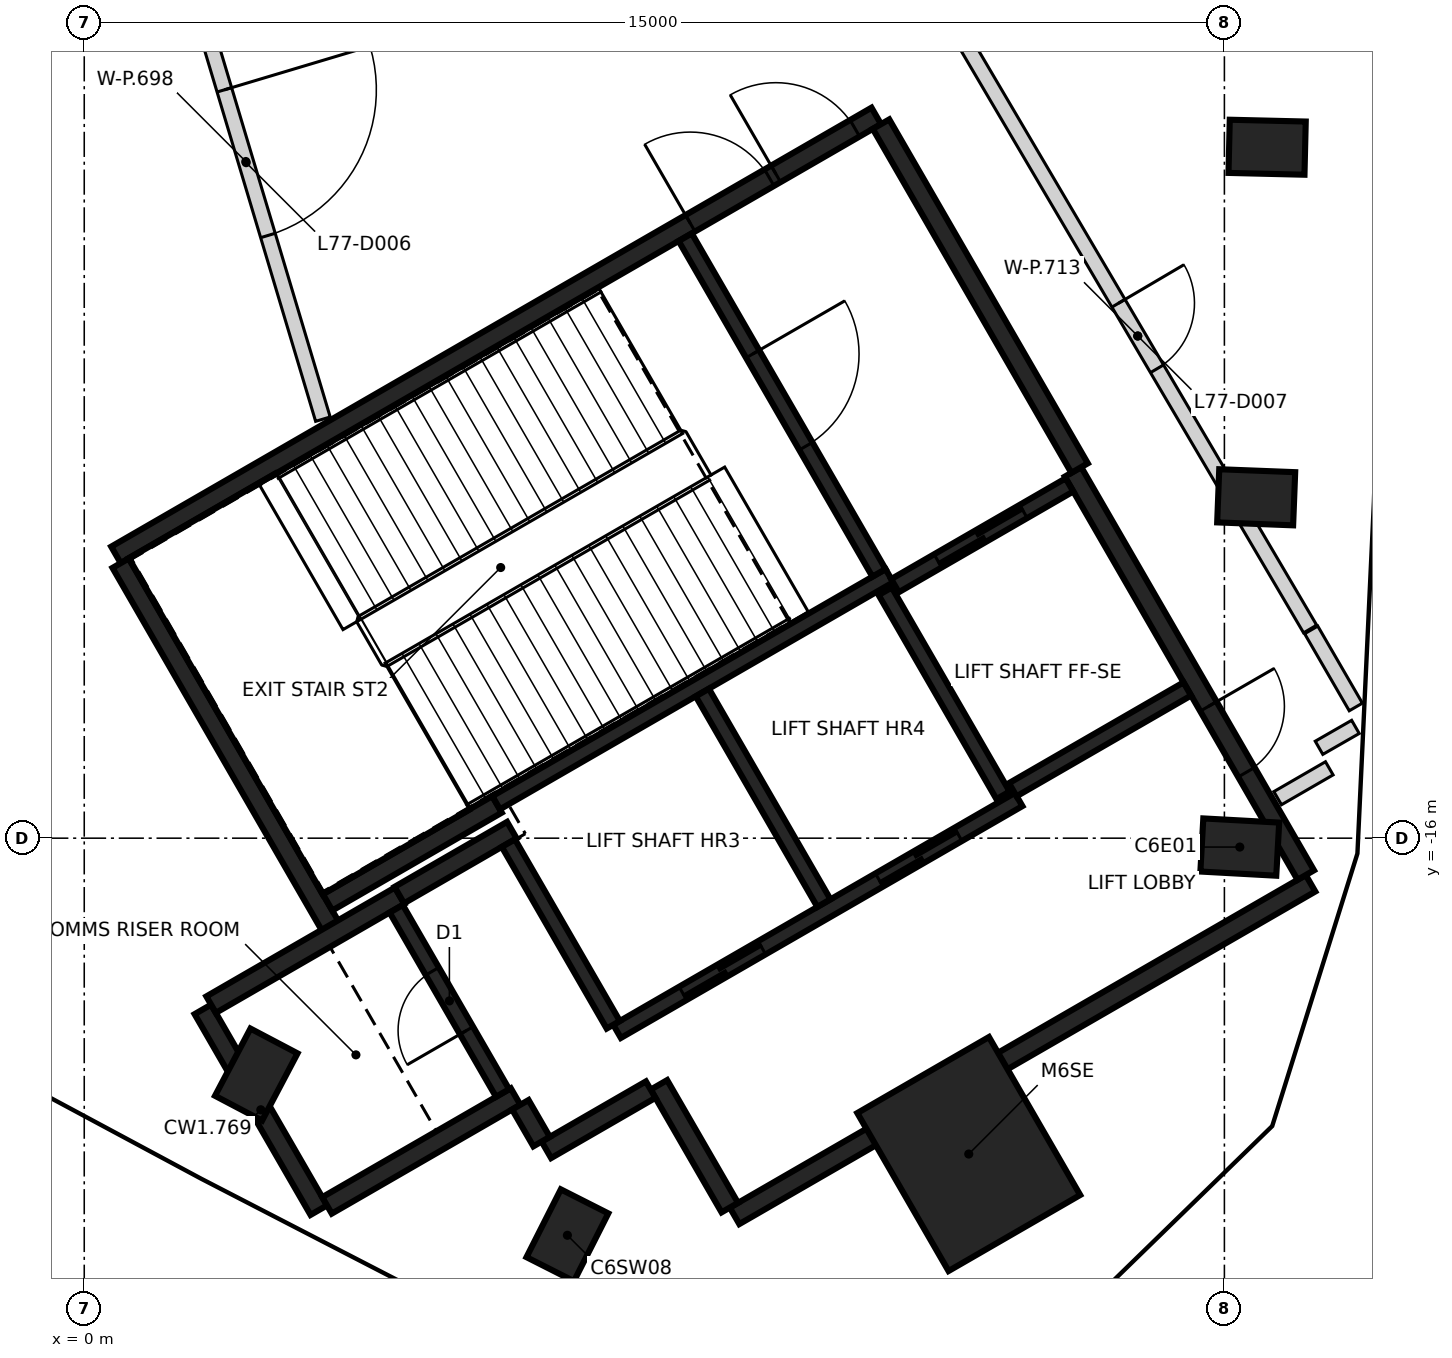
"""IFC4 building model, lengths in metres.
Left out: names, types, materials, properties, quantities, classifications, styles, units other than length and angle.
Written with IfcOpenShell. Run it as: python <this file> out.ifc"""

import sys

from ifc_helpers import new_model, si_unit, direction, frame, frame_2d, origin, origin_2d, place, context, subcontext, project, spatial, rectangle, extrude, element, fill, save


model = new_model("IFC4")
c1 = context("Model", 3, precision=1e-05, world=origin(), true_north=direction((0.0, 1.0)))
c2 = subcontext(c1, "Body", "Model", "MODEL_VIEW")
j1 = project(units=[si_unit("LENGTHUNIT", "METRE"), si_unit("PLANEANGLEUNIT", "RADIAN")], contexts=[c1])
p1 = place(None, origin())
s1 = spatial("IfcSite", under=j1, at=p1, CompositionType="ELEMENT")
p2 = place(p1, origin())
s2 = spatial("IfcBuilding", under=s1, at=p2, CompositionType="ELEMENT")
p3 = place(p2, frame((0.0, 0.0, 306.6)))
s3 = spatial("IfcBuildingStorey", under=s2, at=p3, CompositionType="ELEMENT", Elevation=306.6)
for number, where, z_axis, x_axis in (
    (1, (15.202, -16.117, -0.35), (0.0, 0.0, 1.0), (-0.998, 0.055, 0.0)),
    (2, (15.418, -11.515, -0.35), (0.0, 0.0, 1.0), (-0.999, 0.039, 0.0)),
    (3, (15.562, -6.91, -0.35), (0.0, 0.0, 1.0), (-1.0, 0.024, 0.0)),
    (4, (2.263, -19.11, -0.35), (0.0, 0.0, 1.0), (0.466, 0.885, 0.0)),
    (5, (6.356, -21.224, -0.35), (0.0, 0.0, 1.0), (0.452, 0.892, 0.0)),
):
    element("IfcColumn", number, at=place(p3, frame(where, z_axis=z_axis, x_axis=x_axis)), inside=s3, PredefinedType="COLUMN", context=c2, shape_type="SweptSolid", body=[
        extrude(rectangle(XDim=1.0, YDim=0.7, at=origin_2d()), origin(), (0.0, 0.0, 1.0), 6.0),
    ])
p4 = place(p3, frame((11.637, -20.155, -0.35), z_axis=(0.0, 0.0, 1.0), x_axis=(-0.5, 0.866025403784, 0.0)))
e6 = element("IfcColumn", 6, at=p4, inside=s3, PredefinedType="COLUMN", context=c2, shape_type="SweptSolid", body=[
    extrude(rectangle(XDim=2.4, YDim=2.0, at=origin_2d()), origin(), (0.0, 0.0, 1.0), 6.0),
])
p5 = place(p3, frame((0.417, -12.273, 0.0), z_axis=(0.0, 0.0, 1.0), x_axis=(0.866021906294, 0.500006057782, 0.0)))
e7 = element("IfcWall", 7, at=p5, inside=s3, PredefinedType="SHEAR", context=c2, shape_type="SweptSolid", body=[
    extrude(rectangle(XDim=11.55, YDim=0.25, at=frame_2d((5.775, 0.0))), origin(), (0.0, 0.0, 1.0), 5.65),
])
p6 = place(p5, frame((10.025, 0.0, 0.0)))
e8 = element("IfcOpeningElement", 8, at=p6, cuts=e7, PredefinedType="OPENING", context=c2, shape_type="SweptSolid", body=[
    extrude(rectangle(XDim=1.2, YDim=2.1, at=frame_2d((0.6, 1.05))), frame((0.0, 0.135, 0.0), z_axis=(0.0, -1.0, 0.0), x_axis=(1.0, 0.0, 0.0)), (0.0, 0.0, 1.0), 0.27),
])
p7 = place(p5, frame((8.725, 0.0, 0.0)))
e9 = element("IfcOpeningElement", 9, at=p7, cuts=e7, PredefinedType="OPENING", context=c2, shape_type="SweptSolid", body=[
    extrude(rectangle(XDim=1.2, YDim=2.1, at=frame_2d((0.6, 1.05))), frame((0.0, 0.135, 0.0), z_axis=(0.0, -1.0, 0.0), x_axis=(1.0, 0.0, 0.0)), (0.0, 0.0, 1.0), 0.27),
])
p8 = place(p3, frame((16.133, -16.594, 0.0), z_axis=(0.0, 0.0, 1.0), x_axis=(-0.866022959057, -0.500004234368, 0.0)))
e10 = element("IfcWall", 10, at=p8, inside=s3, PredefinedType="SHEAR", context=c2, shape_type="SweptSolid", body=[
    extrude(rectangle(XDim=8.75, YDim=0.25, at=frame_2d((4.375, 0.0))), origin(), (0.0, 0.0, 1.0), 5.65),
])
p9 = place(p3, frame((13.008, -11.181, 0.0), z_axis=(0.0, 0.0, 1.0), x_axis=(0.500001955336, -0.866024274868, 0.0)))
e11 = element("IfcWall", 11, at=p9, inside=s3, PredefinedType="SHEAR", context=c2, shape_type="SweptSolid", body=[
    extrude(rectangle(XDim=6.125, YDim=0.25, at=frame_2d((3.062, 0.0))), origin(), (0.0, 0.0, 1.0), 5.65),
])
p10 = place(p9, frame((3.563, 0.0, 0.0)))
e12 = element("IfcOpeningElement", 12, at=p10, cuts=e11, PredefinedType="OPENING", context=c2, shape_type="SweptSolid", body=[
    extrude(rectangle(XDim=1.0, YDim=2.1, at=frame_2d((0.5, 1.05))), frame((0.0, 0.135, 0.0), z_axis=(0.0, -1.0, 0.0), x_axis=(1.0, 0.0, 0.0)), (0.0, 0.0, 1.0), 0.27),
])
p11 = place(p3, frame((3.235, -17.153, 0.0), z_axis=(0.0, 0.0, 1.0), x_axis=(-0.500008851346, 0.866020293397, 0.0)))
e13 = element("IfcWall", 13, at=p11, inside=s3, PredefinedType="SHEAR", context=c2, shape_type="SweptSolid", body=[
    extrude(rectangle(XDim=5.51, YDim=0.25, at=frame_2d((2.755, 0.0))), origin(), (0.0, 0.0, 1.0), 5.65),
])
p12 = place(p3, frame((10.483, -6.606, 0.0), z_axis=(0.0, 0.0, 1.0), x_axis=(0.49999885962, -0.866026062182, 0.0)))
e14 = element("IfcWall", 14, at=p12, inside=s3, PredefinedType="SHEAR", context=c2, shape_type="SweptSolid", body=[
    extrude(rectangle(XDim=5.225, YDim=0.25, at=frame_2d((2.612, 0.0))), origin(), (0.0, 0.0, 1.0), 5.65),
])
p13 = place(p3, frame((3.085, -20.894, 0.0), z_axis=(0.0, 0.0, 1.0), x_axis=(-0.499978833458, 0.866037623948, 0.0)))
e15 = element("IfcWall", 15, at=p13, inside=s3, PredefinedType="SHEAR", context=c2, shape_type="SweptSolid", body=[
    extrude(rectangle(XDim=3.05, YDim=0.25, at=frame_2d((1.525, 0.0))), origin(), (0.0, 0.0, 1.0), 5.65),
])
p14 = place(p3, frame((1.669, -18.19, 0.0), z_axis=(0.0, 0.0, 1.0), x_axis=(0.866042235819, 0.499970844928, 0.0)))
e16 = element("IfcWall", 16, at=p14, inside=s3, PredefinedType="SHEAR", context=c2, shape_type="SweptSolid", body=[
    extrude(rectangle(XDim=2.865, YDim=0.25, at=frame_2d((1.432, 0.0))), origin(), (0.0, 0.0, 1.0), 5.65),
])
p15 = place(p3, frame((5.675, -19.399, 0.0), z_axis=(0.0, 0.0, 1.0), x_axis=(-0.866026637627, -0.499997862916, 0.0)))
e17 = element("IfcWall", 17, at=p15, inside=s3, PredefinedType="SHEAR", context=c2, shape_type="SweptSolid", body=[
    extrude(rectangle(XDim=2.865, YDim=0.25, at=frame_2d((1.432, 0.0))), origin(), (0.0, 0.0, 1.0), 5.65),
])
p16 = place(p3, frame((5.431, -15.556, 0.0), z_axis=(0.0, 0.0, 1.0), x_axis=(-0.866022940537, -0.500004266446, 0.0)))
e18 = element("IfcWall", 18, at=p16, inside=s3, PredefinedType="SHEAR", context=c2, shape_type="SweptSolid", body=[
    extrude(rectangle(XDim=2.575, YDim=0.25, at=frame_2d((1.287, 0.0))), origin(), (0.0, 0.0, 1.0), 5.65),
])
p17 = place(p3, frame((8.493, -20.86, 0.0), z_axis=(0.0, 0.0, 1.0), x_axis=(-0.500039802285, 0.866002422705, 0.0)))
e19 = element("IfcWall", 19, at=p17, inside=s3, PredefinedType="SHEAR", context=c2, shape_type="SweptSolid", body=[
    extrude(rectangle(XDim=1.865, YDim=0.25, at=frame_2d((0.932, 0.0))), origin(), (0.0, 0.0, 1.0), 5.65),
])
p18 = place(p3, frame((4.145, -16.749, 0.0), z_axis=(0.0, 0.0, 1.0), x_axis=(0.866038183914, 0.499977863513, 0.0)))
e20 = element("IfcWall", 20, at=p18, inside=s3, PredefinedType="SHEAR", context=c2, shape_type="SweptSolid", body=[
    extrude(rectangle(XDim=1.71, YDim=0.25, at=frame_2d((0.855, 0.0))), origin(), (0.0, 0.0, 1.0), 5.65),
])
p19 = place(p3, frame((7.452, -19.308, 0.0), z_axis=(0.0, 0.0, 1.0), x_axis=(-0.866044474677, -0.49996696679, 0.0)))
e21 = element("IfcWall", 21, at=p19, inside=s3, PredefinedType="SHEAR", context=c2, shape_type="SweptSolid", body=[
    extrude(rectangle(XDim=1.584, YDim=0.25, at=frame_2d((0.792, 0.0))), origin(), (0.0, 0.0, 1.0), 5.65),
])
p20 = place(p3, frame((6.017, -19.992, 0.0), z_axis=(0.0, 0.0, 1.0), x_axis=(-0.500364886717, 0.865814633822, 0.0)))
e22 = element("IfcWall", 22, at=p20, inside=s3, PredefinedType="SHEAR", context=c2, shape_type="SweptSolid", body=[
    extrude(rectangle(XDim=0.559, YDim=0.25, at=frame_2d((0.28, 0.0))), origin(), (0.0, 0.0, 1.0), 5.65),
])
p21 = place(p3, frame((5.419, -15.534, 0.0), z_axis=(0.0, 0.0, 1.0), x_axis=(0.866029065029, 0.499993658486, 0.0)))
e23 = element("IfcWall", 23, at=p21, inside=s3, PredefinedType="SHEAR", context=c2, shape_type="SweptSolid", body=[
    extrude(rectangle(XDim=5.974, YDim=0.2, at=frame_2d((2.987, 0.0))), origin(), (0.0, 0.0, 1.0), 5.65),
])
p22 = place(p3, frame((7.01, -18.542, 0.0), z_axis=(0.0, 0.0, 1.0), x_axis=(0.866030299012, 0.499991521122, 0.0)))
e24 = element("IfcWall", 24, at=p22, inside=s3, PredefinedType="SHEAR", context=c2, shape_type="SweptSolid", body=[
    extrude(rectangle(XDim=6.1, YDim=0.2, at=frame_2d((3.05, 0.0))), origin(), (0.0, 0.0, 1.0), 5.65),
])
p23 = place(p22, frame((1.0, 0.0, 0.0)))
e25 = element("IfcOpeningElement", 25, at=p23, cuts=e24, PredefinedType="OPENING", context=c2, shape_type="SweptSolid", body=[
    extrude(rectangle(XDim=1.2, YDim=2.1, at=frame_2d((0.6, 1.05))), frame((0.0, 0.11, 0.0), z_axis=(0.0, -1.0, 0.0), x_axis=(1.0, 0.0, 0.0)), (0.0, 0.0, 1.0), 0.22),
])
p24 = place(p22, frame((3.982, 0.0, 0.0)))
e26 = element("IfcOpeningElement", 26, at=p24, cuts=e24, PredefinedType="OPENING", context=c2, shape_type="SweptSolid", body=[
    extrude(rectangle(XDim=1.2, YDim=2.1, at=frame_2d((0.6, 1.05))), frame((0.0, 0.11, 0.0), z_axis=(0.0, -1.0, 0.0), x_axis=(1.0, 0.0, 0.0)), (0.0, 0.0, 1.0), 0.22),
])
p25 = place(p3, frame((7.906, -8.094, 0.0), z_axis=(0.0, 0.0, 1.0), x_axis=(0.500027839223, -0.866009330205, 0.0)))
e27 = element("IfcWall", 27, at=p25, inside=s3, PredefinedType="SHEAR", context=c2, shape_type="SweptSolid", body=[
    extrude(rectangle(XDim=5.098, YDim=0.2, at=frame_2d((2.549, 0.0))), origin(), (0.0, 0.0, 1.0), 5.65),
])
p26 = place(p25, frame((1.774, 0.0, 0.0)))
e28 = element("IfcOpeningElement", 28, at=p26, cuts=e27, PredefinedType="OPENING", context=c2, shape_type="SweptSolid", body=[
    extrude(rectangle(XDim=1.4, YDim=2.1, at=frame_2d((0.7, 1.05))), frame((0.0, 0.11, 0.0), z_axis=(0.0, -1.0, 0.0), x_axis=(1.0, 0.0, 0.0)), (0.0, 0.0, 1.0), 0.22),
])
p27 = place(p3, frame((8.132, -14.084, 0.0), z_axis=(0.0, 0.0, 1.0), x_axis=(0.499997778408, -0.866026686418, 0.0)))
e29 = element("IfcWall", 29, at=p27, inside=s3, PredefinedType="SHEAR", context=c2, shape_type="SweptSolid", body=[
    extrude(rectangle(XDim=3.198, YDim=0.2, at=frame_2d((1.599, 0.0))), origin(), (0.0, 0.0, 1.0), 5.65),
])
p28 = place(p3, frame((5.503, -19.352, 0.0), z_axis=(0.0, 0.0, 1.0), x_axis=(-0.499986818241, 0.866033014143, 0.0)))
e30 = element("IfcWall", 30, at=p28, inside=s3, PredefinedType="SHEAR", context=c2, shape_type="SweptSolid", body=[
    extrude(rectangle(XDim=2.798, YDim=0.2, at=frame_2d((1.399, 0.0))), origin(), (0.0, 0.0, 1.0), 5.65),
])
p29 = place(p28, frame((0.949, 0.0, 0.0)))
e31 = element("IfcOpeningElement", 31, at=p29, cuts=e30, PredefinedType="OPENING", context=c2, shape_type="SweptSolid", body=[
    extrude(rectangle(XDim=0.9, YDim=2.1, at=frame_2d((0.45, 1.05))), frame((0.0, 0.11, 0.0), z_axis=(0.0, -1.0, 0.0), x_axis=(1.0, 0.0, 0.0)), (0.0, 0.0, 1.0), 0.22),
])
p30 = place(p3, frame((6.96, -18.455, 0.0), z_axis=(0.0, 0.0, 1.0), x_axis=(-0.499926705758, 0.866067716099, 0.0)))
e32 = element("IfcWall", 32, at=p30, inside=s3, PredefinedType="SHEAR", context=c2, shape_type="SweptSolid", body=[
    extrude(rectangle(XDim=2.759, YDim=0.2, at=frame_2d((1.38, 0.0))), origin(), (0.0, 0.0, 1.0), 5.65),
])
p31 = place(p3, frame((12.088, -15.437, 0.0), z_axis=(0.0, 0.0, 1.0), x_axis=(-0.500026960575, 0.86600983753, 0.0)))
e33 = element("IfcWall", 33, at=p31, inside=s3, PredefinedType="SHEAR", context=c2, shape_type="SweptSolid", body=[
    extrude(rectangle(XDim=3.1, YDim=0.2, at=frame_2d((1.55, 0.0))), origin(), (0.0, 0.0, 1.0), 5.65),
])
p32 = place(p3, frame((10.666, -12.678, 0.0), z_axis=(0.0, 0.0, 1.0), x_axis=(0.866018407898, 0.500012117035, 0.0)))
e34 = element("IfcWall", 34, at=p32, inside=s3, PredefinedType="SHEAR", context=c2, shape_type="SweptSolid", body=[
    extrude(rectangle(XDim=2.651, YDim=0.2, at=frame_2d((1.325, 0.0))), origin(), (0.0, 0.0, 1.0), 5.65),
])
p33 = place(p32, frame((0.652, 0.0, 0.0)))
e35 = element("IfcOpeningElement", 35, at=p33, cuts=e34, PredefinedType="OPENING", context=c2, shape_type="SweptSolid", body=[
    extrude(rectangle(XDim=1.3, YDim=2.1, at=frame_2d((0.65, 1.05))), frame((0.0, 0.11, 0.0), z_axis=(0.0, -1.0, 0.0), x_axis=(1.0, 0.0, 0.0)), (0.0, 0.0, 1.0), 0.22),
])
p34 = place(p3, frame((14.512, -14.037, 0.0), z_axis=(0.0, 0.0, 1.0), x_axis=(-0.866018407898, -0.500012117035, 0.0)))
e36 = element("IfcWall", 36, at=p34, inside=s3, PredefinedType="SHEAR", context=c2, shape_type="SweptSolid", body=[
    extrude(rectangle(XDim=2.651, YDim=0.2, at=frame_2d((1.325, 0.0))), origin(), (0.0, 0.0, 1.0), 5.65),
])
p35 = place(p3, frame((1.111, -3.708, 0.0), z_axis=(0.0, 0.0, 1.0), x_axis=(0.286702116172, -0.958019778805, 0.0)))
e37 = element("IfcWall", 37, at=p35, inside=s3, PredefinedType="PARTITIONING", context=c2, shape_type="SweptSolid", body=[
    extrude(rectangle(XDim=7.076, YDim=0.2, at=frame_2d((3.538, 0.0))), origin(), (0.0, 0.0, 1.0), 5.65),
])
p36 = place(p35, frame((2.554, 0.0, 0.0)))
e38 = element("IfcOpeningElement", 38, at=p36, cuts=e37, PredefinedType="OPENING", context=c2, shape_type="SweptSolid", body=[
    extrude(rectangle(XDim=2.0, YDim=2.1, at=frame_2d((1.0, 1.05))), frame((0.0, 0.11, 0.0), z_axis=(0.0, -1.0, 0.0), x_axis=(1.0, 0.0, 0.0)), (0.0, 0.0, 1.0), 0.22),
])
p37 = place(p3, frame((11.592, -5.539, 0.0), z_axis=(0.0, 0.0, 1.0), x_axis=(0.507119130029, -0.861875970171, 0.0)))
e39 = element("IfcWall", 39, at=p37, inside=s3, PredefinedType="PARTITIONING", context=c2, shape_type="SweptSolid", body=[
    extrude(rectangle(XDim=8.944, YDim=0.2, at=frame_2d((4.472, 0.0))), origin(), (0.0, 0.0, 1.0), 4.75),
])
p38 = place(p37, frame((3.972, 0.0, 0.0)))
e40 = element("IfcOpeningElement", 40, at=p38, cuts=e39, PredefinedType="OPENING", context=c2, shape_type="SweptSolid", body=[
    extrude(rectangle(XDim=1.0, YDim=2.1, at=frame_2d((0.5, 1.05))), frame((0.0, 0.11, 0.0), z_axis=(0.0, -1.0, 0.0), x_axis=(1.0, 0.0, 0.0)), (0.0, 0.0, 1.0), 0.22),
])
p39 = place(p3, frame((15.7, -15.474, 0.0), z_axis=(0.0, 0.0, 1.0), x_axis=(0.865724300447, 0.500521164003, 0.0)))
e41 = element("IfcWall", 41, at=p39, inside=s3, PredefinedType="PARTITIONING", context=c2, shape_type="SweptSolid", body=[
    extrude(rectangle(XDim=0.785, YDim=0.2, at=frame_2d((0.393, 0.0))), origin(), (0.0, 0.0, 1.0), 5.65),
])
p40 = place(p3, frame((16.142, -13.26, 0.0), z_axis=(0.0, 0.0, 1.0), x_axis=(0.500978766574, -0.865459574701, 0.0)))
e42 = element("IfcWall", 42, at=p40, inside=s3, PredefinedType="PARTITIONING", context=c2, shape_type="SweptSolid", body=[
    extrude(rectangle(XDim=1.172, YDim=0.2, at=frame_2d((0.586, 0.0))), origin(), (0.0, 0.0, 1.0), 5.65),
])
p41 = place(p3, frame((16.245, -14.811, 0.0), z_axis=(0.0, 0.0, 1.0), x_axis=(0.867125849654, 0.498089109358, 0.0)))
e43 = element("IfcWall", 43, at=p41, inside=s3, PredefinedType="PARTITIONING", context=c2, shape_type="SweptSolid", body=[
    extrude(rectangle(XDim=0.552, YDim=0.2, at=frame_2d((0.276, 0.0))), origin(), (0.0, 0.0, 1.0), 5.65),
])
p42 = place(p33, origin())
e44 = element("IfcDoor", 44, at=p42, inside=s3, OperationType="SLIDING_TO_RIGHT", PredefinedType="DOOR", context=c2, shape_type="SweptSolid", body=[
    extrude(rectangle(XDim=1.3, YDim=2.1, at=frame_2d((0.65, 1.05))), frame((0.0, 0.025, 0.0), z_axis=(0.0, -1.0, 0.0), x_axis=(1.0, 0.0, 0.0)), (0.0, 0.0, 1.0), 0.05),
])
fill(e35, e44)
p43 = place(p23, origin())
e45 = element("IfcDoor", 45, at=p43, inside=s3, OperationType="DOUBLE_DOOR_SLIDING", PredefinedType="DOOR", context=c2, shape_type="SweptSolid", body=[
    extrude(rectangle(XDim=1.2, YDim=2.1, at=frame_2d((0.6, 1.05))), frame((0.0, 0.025, 0.0), z_axis=(0.0, -1.0, 0.0), x_axis=(1.0, 0.0, 0.0)), (0.0, 0.0, 1.0), 0.05),
])
fill(e25, e45)
p44 = place(p24, origin())
e46 = element("IfcDoor", 46, at=p44, inside=s3, OperationType="DOUBLE_DOOR_SLIDING", PredefinedType="DOOR", context=c2, shape_type="SweptSolid", body=[
    extrude(rectangle(XDim=1.2, YDim=2.1, at=frame_2d((0.6, 1.05))), frame((0.0, 0.025, 0.0), z_axis=(0.0, -1.0, 0.0), x_axis=(1.0, 0.0, 0.0)), (0.0, 0.0, 1.0), 0.05),
])
fill(e26, e46)
p45 = place(p10, origin())
e47 = element("IfcDoor", 47, at=p45, inside=s3, OperationType="SINGLE_SWING_LEFT", PredefinedType="DOOR", context=c2, shape_type="SweptSolid", body=[
    extrude(rectangle(XDim=1.0, YDim=2.1, at=frame_2d((0.5, 1.05))), frame((0.0, 0.025, 0.0), z_axis=(0.0, -1.0, 0.0), x_axis=(1.0, 0.0, 0.0)), (0.0, 0.0, 1.0), 0.05),
])
fill(e12, e47)
p46 = place(p6, origin())
e48 = element("IfcDoor", 48, at=p46, inside=s3, OperationType="SINGLE_SWING_LEFT", PredefinedType="DOOR", context=c2, shape_type="SweptSolid", body=[
    extrude(rectangle(XDim=1.2, YDim=2.1, at=frame_2d((0.6, 1.05))), frame((0.0, 0.025, 0.0), z_axis=(0.0, -1.0, 0.0), x_axis=(1.0, 0.0, 0.0)), (0.0, 0.0, 1.0), 0.05),
])
fill(e8, e48)
p47 = place(p7, origin())
e49 = element("IfcDoor", 49, at=p47, inside=s3, OperationType="SINGLE_SWING_RIGHT", PredefinedType="DOOR", context=c2, shape_type="SweptSolid", body=[
    extrude(rectangle(XDim=1.2, YDim=2.1, at=frame_2d((0.6, 1.05))), frame((0.0, 0.025, 0.0), z_axis=(0.0, -1.0, 0.0), x_axis=(1.0, 0.0, 0.0)), (0.0, 0.0, 1.0), 0.05),
])
fill(e9, e49)
p48 = place(p26, origin())
e50 = element("IfcDoor", 50, at=p48, inside=s3, OperationType="SINGLE_SWING_RIGHT", PredefinedType="DOOR", context=c2, shape_type="SweptSolid", body=[
    extrude(rectangle(XDim=1.4, YDim=2.1, at=frame_2d((0.7, 1.05))), frame((0.0, 0.025, 0.0), z_axis=(0.0, -1.0, 0.0), x_axis=(1.0, 0.0, 0.0)), (0.0, 0.0, 1.0), 0.05),
])
fill(e28, e50)
p49 = place(p29, origin())
e51 = element("IfcDoor", 51, at=p49, inside=s3, OperationType="SINGLE_SWING_LEFT", PredefinedType="DOOR", context=c2, shape_type="SweptSolid", body=[
    extrude(rectangle(XDim=0.9, YDim=2.1, at=frame_2d((0.45, 1.05))), frame((0.0, 0.025, 0.0), z_axis=(0.0, -1.0, 0.0), x_axis=(1.0, 0.0, 0.0)), (0.0, 0.0, 1.0), 0.05),
])
fill(e31, e51)
p50 = place(p36, frame((2.0, 0.0, 0.0), z_axis=(0.0, 0.0, 1.0), x_axis=(-1.0, 0.0, 0.0)))
e52 = element("IfcDoor", 52, at=p50, inside=s3, OperationType="DOUBLE_DOOR_SINGLE_SWING", PredefinedType="DOOR", context=c2, shape_type="SweptSolid", body=[
    extrude(rectangle(XDim=2.0, YDim=2.1, at=frame_2d((1.0, 1.05))), frame((0.0, 0.025, 0.0), z_axis=(0.0, -1.0, 0.0), x_axis=(1.0, 0.0, 0.0)), (0.0, 0.0, 1.0), 0.05),
])
fill(e38, e52)
p51 = place(p38, origin())
e53 = element("IfcDoor", 53, at=p51, inside=s3, OperationType="SINGLE_SWING_LEFT", PredefinedType="DOOR", context=c2, shape_type="SweptSolid", body=[
    extrude(rectangle(XDim=1.0, YDim=2.1, at=frame_2d((0.5, 1.05))), frame((0.0, 0.025, 0.0), z_axis=(0.0, -1.0, 0.0), x_axis=(1.0, 0.0, 0.0)), (0.0, 0.0, 1.0), 0.05),
])
fill(e40, e53)
save(model, sys.argv[1])
